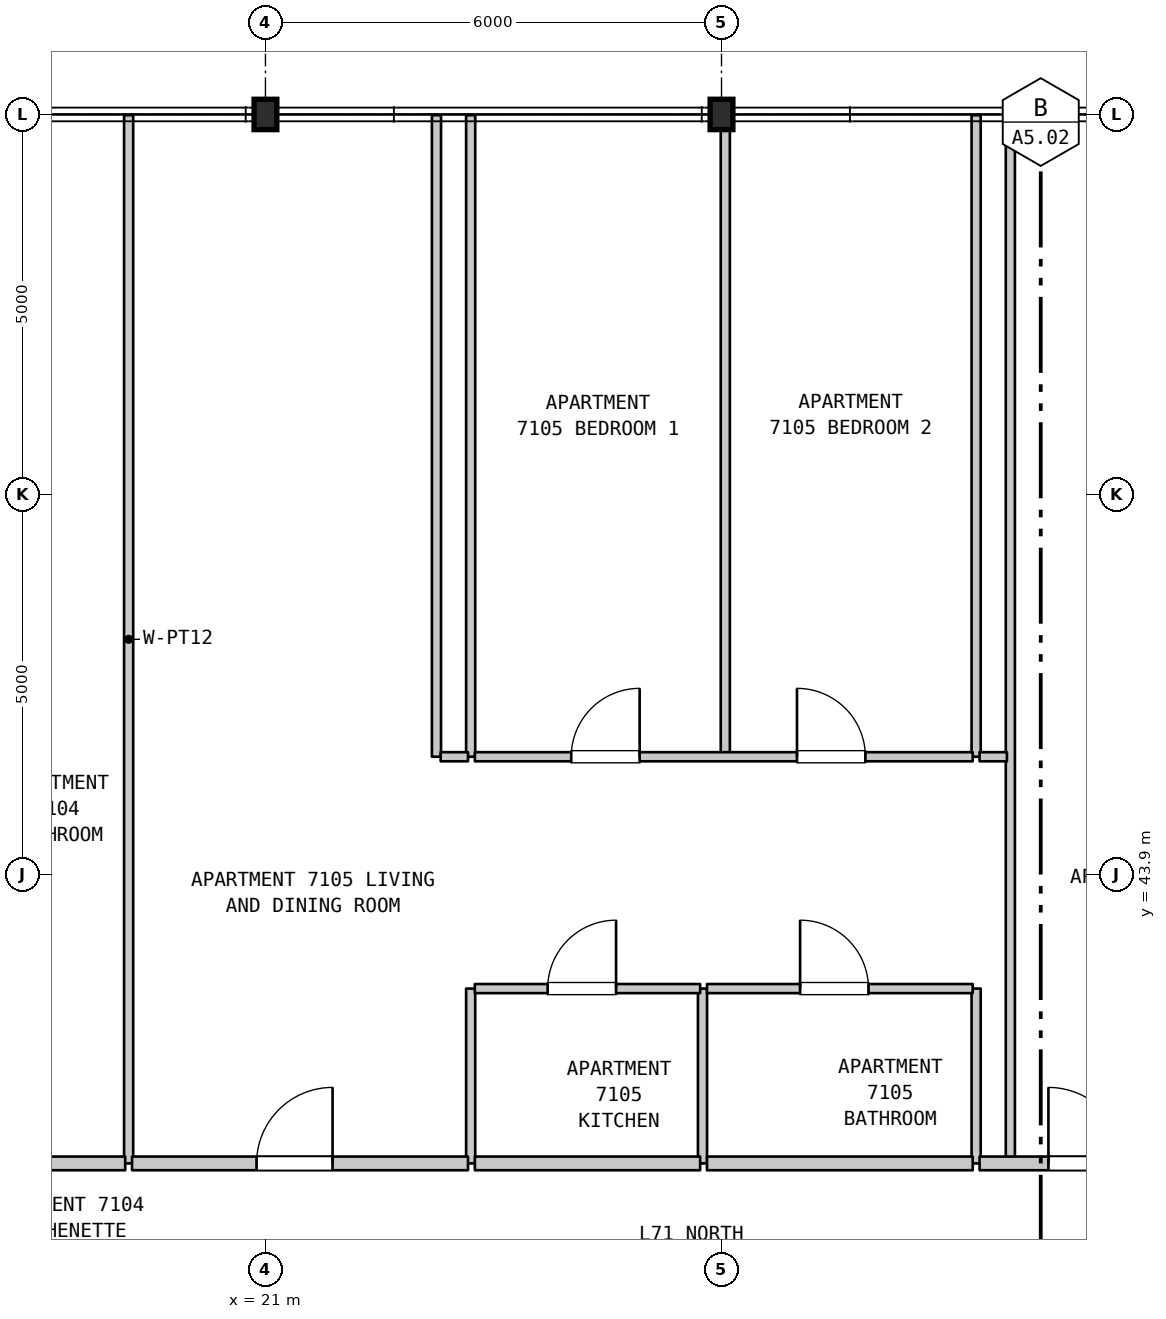
"""IFC4 building model, lengths in metres.
Left out: names, types, materials, properties, quantities, classifications, styles, units other than length and angle.
Written with IfcOpenShell. Run it as: python <this file> out.ifc"""

import sys

from ifc_helpers import new_model, si_unit, direction, frame, frame_2d, origin, origin_2d, place, context, subcontext, project, spatial, rectangle, i_section, extrude, element, fill, save


model = new_model("IFC4")
c1 = context("Model", 3, precision=1e-05, world=origin(), true_north=direction((0.0, 1.0)))
c2 = subcontext(c1, "Body", "Model", "MODEL_VIEW")
j1 = project(units=[si_unit("LENGTHUNIT", "METRE"), si_unit("PLANEANGLEUNIT", "RADIAN")], contexts=[c1])
p1 = place(None, origin())
s1 = spatial("IfcSite", under=j1, at=p1, CompositionType="ELEMENT")
p2 = place(p1, origin())
s2 = spatial("IfcBuilding", under=s1, at=p2, CompositionType="ELEMENT")
p3 = place(p2, frame((0.0, 0.0, 284.3)))
s3 = spatial("IfcBuildingStorey", under=s2, at=p3, CompositionType="ELEMENT", Elevation=284.3)
for number, where, z_axis, x_axis in (
    (1, (21.0, 53.9, 0.0), (0.0, 0.0, 1.0), (1.0, 0.0, 0.0)),
    (2, (27.0, 53.9, 0.0), (0.0, 0.0, 1.0), (1.0, 0.0, 0.0)),
):
    element("IfcColumn", number, at=place(p3, frame(where, z_axis=z_axis, x_axis=x_axis)), inside=s3, PredefinedType="COLUMN", context=c2, shape_type="SweptSolid", body=[
        extrude(i_section(OverallWidth=0.3, OverallDepth=0.4, WebThickness=0.013, FlangeThickness=0.024, FilletRadius=0.027, at=origin_2d()), origin(), (0.0, 0.0, 1.0), 3.7),
    ])
p4 = place(p3, frame((19.2, 40.1, 0.0), z_axis=(0.0, 0.0, 1.0), x_axis=(0.0, 1.0, 0.0)))
e3 = element("IfcWall", 3, at=p4, inside=s3, PredefinedType="PARTITIONING", context=c2, shape_type="SweptSolid", body=[
    extrude(rectangle(XDim=13.79, YDim=0.12, at=frame_2d((6.895, 0.0))), origin(), (0.0, 0.0, 1.0), 3.39),
])
p5 = place(p3, frame((23.25, 45.45, 0.0), z_axis=(0.0, 0.0, 1.0), x_axis=(0.0, 1.0, 0.0)))
e4 = element("IfcWall", 4, at=p5, inside=s3, PredefinedType="PARTITIONING", context=c2, shape_type="SweptSolid", body=[
    extrude(rectangle(XDim=8.44, YDim=0.12, at=frame_2d((4.22, 0.0))), origin(), (0.0, 0.0, 1.0), 3.39),
])
p6 = place(p3, frame((23.7, 40.1, 0.0), z_axis=(0.0, 0.0, 1.0), x_axis=(0.0, 1.0, 0.0)))
e5 = element("IfcWall", 5, at=p6, inside=s3, PredefinedType="PARTITIONING", context=c2, shape_type="SweptSolid", body=[
    extrude(rectangle(XDim=2.3, YDim=0.12, at=frame_2d((1.15, 0.0))), origin(), (0.0, 0.0, 1.0), 3.39),
])
p7 = place(p3, frame((23.7, 45.45, 0.0), z_axis=(0.0, 0.0, 1.0), x_axis=(0.0, 1.0, 0.0)))
e6 = element("IfcWall", 6, at=p7, inside=s3, PredefinedType="PARTITIONING", context=c2, shape_type="SweptSolid", body=[
    extrude(rectangle(XDim=8.44, YDim=0.12, at=frame_2d((4.22, 0.0))), origin(), (0.0, 0.0, 1.0), 3.39),
])
p8 = place(p3, frame((26.75, 40.1, 0.0), z_axis=(0.0, 0.0, 1.0), x_axis=(0.0, 1.0, 0.0)))
e7 = element("IfcWall", 7, at=p8, inside=s3, PredefinedType="PARTITIONING", context=c2, shape_type="SweptSolid", body=[
    extrude(rectangle(XDim=2.3, YDim=0.12, at=frame_2d((1.15, 0.0))), origin(), (0.0, 0.0, 1.0), 3.39),
])
p9 = place(p3, frame((27.05, 45.45, 0.0), z_axis=(0.0, 0.0, 1.0), x_axis=(0.0, 1.0, 0.0)))
e8 = element("IfcWall", 8, at=p9, inside=s3, PredefinedType="PARTITIONING", context=c2, shape_type="SweptSolid", body=[
    extrude(rectangle(XDim=8.44, YDim=0.12, at=frame_2d((4.22, 0.0))), origin(), (0.0, 0.0, 1.0), 3.15),
])
p10 = place(p3, frame((30.35, 40.1, 0.0), z_axis=(0.0, 0.0, 1.0), x_axis=(0.0, 1.0, 0.0)))
e9 = element("IfcWall", 9, at=p10, inside=s3, PredefinedType="PARTITIONING", context=c2, shape_type="SweptSolid", body=[
    extrude(rectangle(XDim=2.3, YDim=0.12, at=frame_2d((1.15, 0.0))), origin(), (0.0, 0.0, 1.0), 3.39),
])
p11 = place(p3, frame((30.35, 45.45, 0.0), z_axis=(0.0, 0.0, 1.0), x_axis=(0.0, 1.0, 0.0)))
e10 = element("IfcWall", 10, at=p11, inside=s3, PredefinedType="PARTITIONING", context=c2, shape_type="SweptSolid", body=[
    extrude(rectangle(XDim=8.44, YDim=0.12, at=frame_2d((4.22, 0.0))), origin(), (0.0, 0.0, 1.0), 3.39),
])
p12 = place(p3, frame((30.8, 40.1, 0.0), z_axis=(0.0, 0.0, 1.0), x_axis=(0.0, 1.0, 0.0)))
e11 = element("IfcWall", 11, at=p12, inside=s3, PredefinedType="PARTITIONING", context=c2, shape_type="SweptSolid", body=[
    extrude(rectangle(XDim=13.79, YDim=0.12, at=frame_2d((6.895, 0.0))), origin(), (0.0, 0.0, 1.0), 3.39),
])
p13 = place(p3, frame((17.295, 40.1, 0.0), z_axis=(0.0, 0.0, 1.0), x_axis=(1.0, 0.0, 0.0)))
e12 = element("IfcWall", 12, at=p13, inside=s3, PredefinedType="STANDARD", context=c2, shape_type="SweptSolid", body=[
    extrude(rectangle(XDim=1.86, YDim=0.18, at=frame_2d((0.93, 0.0))), origin(), (0.0, 0.0, 1.0), 3.39),
])
p14 = place(p3, frame((19.245, 40.1, 0.0), z_axis=(0.0, 0.0, 1.0), x_axis=(1.0, 0.0, 0.0)))
e13 = element("IfcWall", 13, at=p14, inside=s3, PredefinedType="STANDARD", context=c2, shape_type="SweptSolid", body=[
    extrude(rectangle(XDim=4.42, YDim=0.18, at=frame_2d((2.21, 0.0))), origin(), (0.0, 0.0, 1.0), 3.39),
])
p15 = place(p14, frame((1.638, 0.0, 0.0)))
e14 = element("IfcOpeningElement", 14, at=p15, cuts=e13, PredefinedType="OPENING", context=c2, shape_type="SweptSolid", body=[
    extrude(rectangle(XDim=1.0, YDim=2.15, at=frame_2d((0.5, 1.075))), frame((0.0, 0.1, 0.0), z_axis=(0.0, -1.0, 0.0), x_axis=(1.0, 0.0, 0.0)), (0.0, 0.0, 1.0), 0.2),
])
p16 = place(p3, frame((23.755, 40.1, 0.0), z_axis=(0.0, 0.0, 1.0), x_axis=(1.0, 0.0, 0.0)))
e15 = element("IfcWall", 15, at=p16, inside=s3, PredefinedType="STANDARD", context=c2, shape_type="SweptSolid", body=[
    extrude(rectangle(XDim=2.964, YDim=0.18, at=frame_2d((1.482, 0.0))), origin(), (0.0, 0.0, 1.0), 3.39),
])
p17 = place(p3, frame((26.809, 40.1, 0.0), z_axis=(0.0, 0.0, 1.0), x_axis=(1.0, 0.0, 0.0)))
e16 = element("IfcWall", 16, at=p17, inside=s3, PredefinedType="STANDARD", context=c2, shape_type="SweptSolid", body=[
    extrude(rectangle(XDim=3.496, YDim=0.18, at=frame_2d((1.748, 0.0))), origin(), (0.0, 0.0, 1.0), 3.39),
])
p18 = place(p3, frame((30.395, 40.1, 0.0), z_axis=(0.0, 0.0, 1.0), x_axis=(1.0, 0.0, 0.0)))
e17 = element("IfcWall", 17, at=p18, inside=s3, PredefinedType="STANDARD", context=c2, shape_type="SweptSolid", body=[
    extrude(rectangle(XDim=2.545, YDim=0.18, at=frame_2d((1.272, 0.0))), origin(), (0.0, 0.0, 1.0), 3.39),
])
p19 = place(p18, frame((0.906, 0.0, 0.0)))
e18 = element("IfcOpeningElement", 18, at=p19, cuts=e17, PredefinedType="OPENING", context=c2, shape_type="SweptSolid", body=[
    extrude(rectangle(XDim=1.0, YDim=2.15, at=frame_2d((0.5, 1.075))), frame((0.0, 0.1, 0.0), z_axis=(0.0, -1.0, 0.0), x_axis=(1.0, 0.0, 0.0)), (0.0, 0.0, 1.0), 0.2),
])
p20 = place(p3, frame((23.755, 42.4, 0.0), z_axis=(0.0, 0.0, 1.0), x_axis=(1.0, 0.0, 0.0)))
e19 = element("IfcWall", 19, at=p20, inside=s3, PredefinedType="PARTITIONING", context=c2, shape_type="SweptSolid", body=[
    extrude(rectangle(XDim=2.964, YDim=0.12, at=frame_2d((1.482, 0.0))), origin(), (0.0, 0.0, 1.0), 3.39),
])
p21 = place(p20, frame((0.958, 0.0, 0.0)))
e20 = element("IfcOpeningElement", 20, at=p21, cuts=e19, PredefinedType="OPENING", context=c2, shape_type="SweptSolid", body=[
    extrude(rectangle(XDim=0.9, YDim=2.15, at=frame_2d((0.45, 1.075))), frame((0.0, 0.07, 0.0), z_axis=(0.0, -1.0, 0.0), x_axis=(1.0, 0.0, 0.0)), (0.0, 0.0, 1.0), 0.14),
])
p22 = place(p3, frame((26.809, 42.4, 0.0), z_axis=(0.0, 0.0, 1.0), x_axis=(1.0, 0.0, 0.0)))
e21 = element("IfcWall", 21, at=p22, inside=s3, PredefinedType="PARTITIONING", context=c2, shape_type="SweptSolid", body=[
    extrude(rectangle(XDim=3.496, YDim=0.12, at=frame_2d((1.748, 0.0))), origin(), (0.0, 0.0, 1.0), 3.39),
])
p23 = place(p22, frame((1.225, 0.0, 0.0)))
e22 = element("IfcOpeningElement", 22, at=p23, cuts=e21, PredefinedType="OPENING", context=c2, shape_type="SweptSolid", body=[
    extrude(rectangle(XDim=0.9, YDim=2.1, at=frame_2d((0.45, 1.05))), frame((0.0, 0.07, 0.0), z_axis=(0.0, -1.0, 0.0), x_axis=(1.0, 0.0, 0.0)), (0.0, 0.0, 1.0), 0.14),
])
p24 = place(p3, frame((23.305, 45.45, 0.0), z_axis=(0.0, 0.0, 1.0), x_axis=(1.0, 0.0, 0.0)))
e23 = element("IfcWall", 23, at=p24, inside=s3, PredefinedType="PARTITIONING", context=c2, shape_type="SweptSolid", body=[
    extrude(rectangle(XDim=0.36, YDim=0.12, at=frame_2d((0.18, 0.0))), origin(), (0.0, 0.0, 1.0), 3.39),
])
p25 = place(p3, frame((23.755, 45.45, 0.0), z_axis=(0.0, 0.0, 1.0), x_axis=(1.0, 0.0, 0.0)))
e24 = element("IfcWall", 24, at=p25, inside=s3, PredefinedType="PARTITIONING", context=c2, shape_type="SweptSolid", body=[
    extrude(rectangle(XDim=6.55, YDim=0.12, at=frame_2d((3.275, 0.0))), origin(), (0.0, 0.0, 1.0), 3.39),
])
p26 = place(p25, frame((1.268, 0.0, 0.0)))
e25 = element("IfcOpeningElement", 25, at=p26, cuts=e24, PredefinedType="OPENING", context=c2, shape_type="SweptSolid", body=[
    extrude(rectangle(XDim=0.9, YDim=2.15, at=frame_2d((0.45, 1.075))), frame((0.0, 0.07, 0.0), z_axis=(0.0, -1.0, 0.0), x_axis=(1.0, 0.0, 0.0)), (0.0, 0.0, 1.0), 0.14),
])
p27 = place(p25, frame((4.238, 0.0, 0.0)))
e26 = element("IfcOpeningElement", 26, at=p27, cuts=e24, PredefinedType="OPENING", context=c2, shape_type="SweptSolid", body=[
    extrude(rectangle(XDim=0.9, YDim=2.15, at=frame_2d((0.45, 1.075))), frame((0.0, 0.07, 0.0), z_axis=(0.0, -1.0, 0.0), x_axis=(1.0, 0.0, 0.0)), (0.0, 0.0, 1.0), 0.14),
])
p28 = place(p3, frame((30.395, 45.45, 0.0), z_axis=(0.0, 0.0, 1.0), x_axis=(1.0, 0.0, 0.0)))
e27 = element("IfcWall", 27, at=p28, inside=s3, PredefinedType="PARTITIONING", context=c2, shape_type="SweptSolid", body=[
    extrude(rectangle(XDim=0.36, YDim=0.12, at=frame_2d((0.18, 0.0))), origin(), (0.0, 0.0, 1.0), 3.39),
])
p29 = place(p15, origin())
e28 = element("IfcDoor", 28, at=p29, inside=s3, OperationType="SINGLE_SWING_RIGHT", PredefinedType="DOOR", context=c2, shape_type="SweptSolid", body=[
    extrude(rectangle(XDim=1.0, YDim=2.15, at=frame_2d((0.5, 1.075))), frame((0.0, 0.025, 0.0), z_axis=(0.0, -1.0, 0.0), x_axis=(1.0, 0.0, 0.0)), (0.0, 0.0, 1.0), 0.05),
])
fill(e14, e28)
p30 = place(p19, origin())
e29 = element("IfcDoor", 29, at=p30, inside=s3, OperationType="SINGLE_SWING_LEFT", PredefinedType="DOOR", context=c2, shape_type="SweptSolid", body=[
    extrude(rectangle(XDim=1.0, YDim=2.15, at=frame_2d((0.5, 1.075))), frame((0.0, 0.025, 0.0), z_axis=(0.0, -1.0, 0.0), x_axis=(1.0, 0.0, 0.0)), (0.0, 0.0, 1.0), 0.05),
])
fill(e18, e29)
p31 = place(p21, origin())
e30 = element("IfcDoor", 30, at=p31, inside=s3, OperationType="SINGLE_SWING_RIGHT", PredefinedType="DOOR", context=c2, shape_type="SweptSolid", body=[
    extrude(rectangle(XDim=0.9, YDim=2.15, at=frame_2d((0.45, 1.075))), frame((0.0, 0.025, 0.0), z_axis=(0.0, -1.0, 0.0), x_axis=(1.0, 0.0, 0.0)), (0.0, 0.0, 1.0), 0.05),
])
fill(e20, e30)
p32 = place(p23, origin())
e31 = element("IfcDoor", 31, at=p32, inside=s3, OperationType="SINGLE_SWING_LEFT", PredefinedType="DOOR", context=c2, shape_type="SweptSolid", body=[
    extrude(rectangle(XDim=0.9, YDim=2.1, at=frame_2d((0.45, 1.05))), frame((0.0, 0.025, 0.0), z_axis=(0.0, -1.0, 0.0), x_axis=(1.0, 0.0, 0.0)), (0.0, 0.0, 1.0), 0.05),
])
fill(e22, e31)
p33 = place(p26, origin())
e32 = element("IfcDoor", 32, at=p33, inside=s3, OperationType="SINGLE_SWING_RIGHT", PredefinedType="DOOR", context=c2, shape_type="SweptSolid", body=[
    extrude(rectangle(XDim=0.9, YDim=2.15, at=frame_2d((0.45, 1.075))), frame((0.0, 0.025, 0.0), z_axis=(0.0, -1.0, 0.0), x_axis=(1.0, 0.0, 0.0)), (0.0, 0.0, 1.0), 0.05),
])
fill(e25, e32)
p34 = place(p27, origin())
e33 = element("IfcDoor", 33, at=p34, inside=s3, OperationType="SINGLE_SWING_LEFT", PredefinedType="DOOR", context=c2, shape_type="SweptSolid", body=[
    extrude(rectangle(XDim=0.9, YDim=2.15, at=frame_2d((0.45, 1.075))), frame((0.0, 0.025, 0.0), z_axis=(0.0, -1.0, 0.0), x_axis=(1.0, 0.0, 0.0)), (0.0, 0.0, 1.0), 0.05),
])
fill(e26, e33)
save(model, sys.argv[1])
